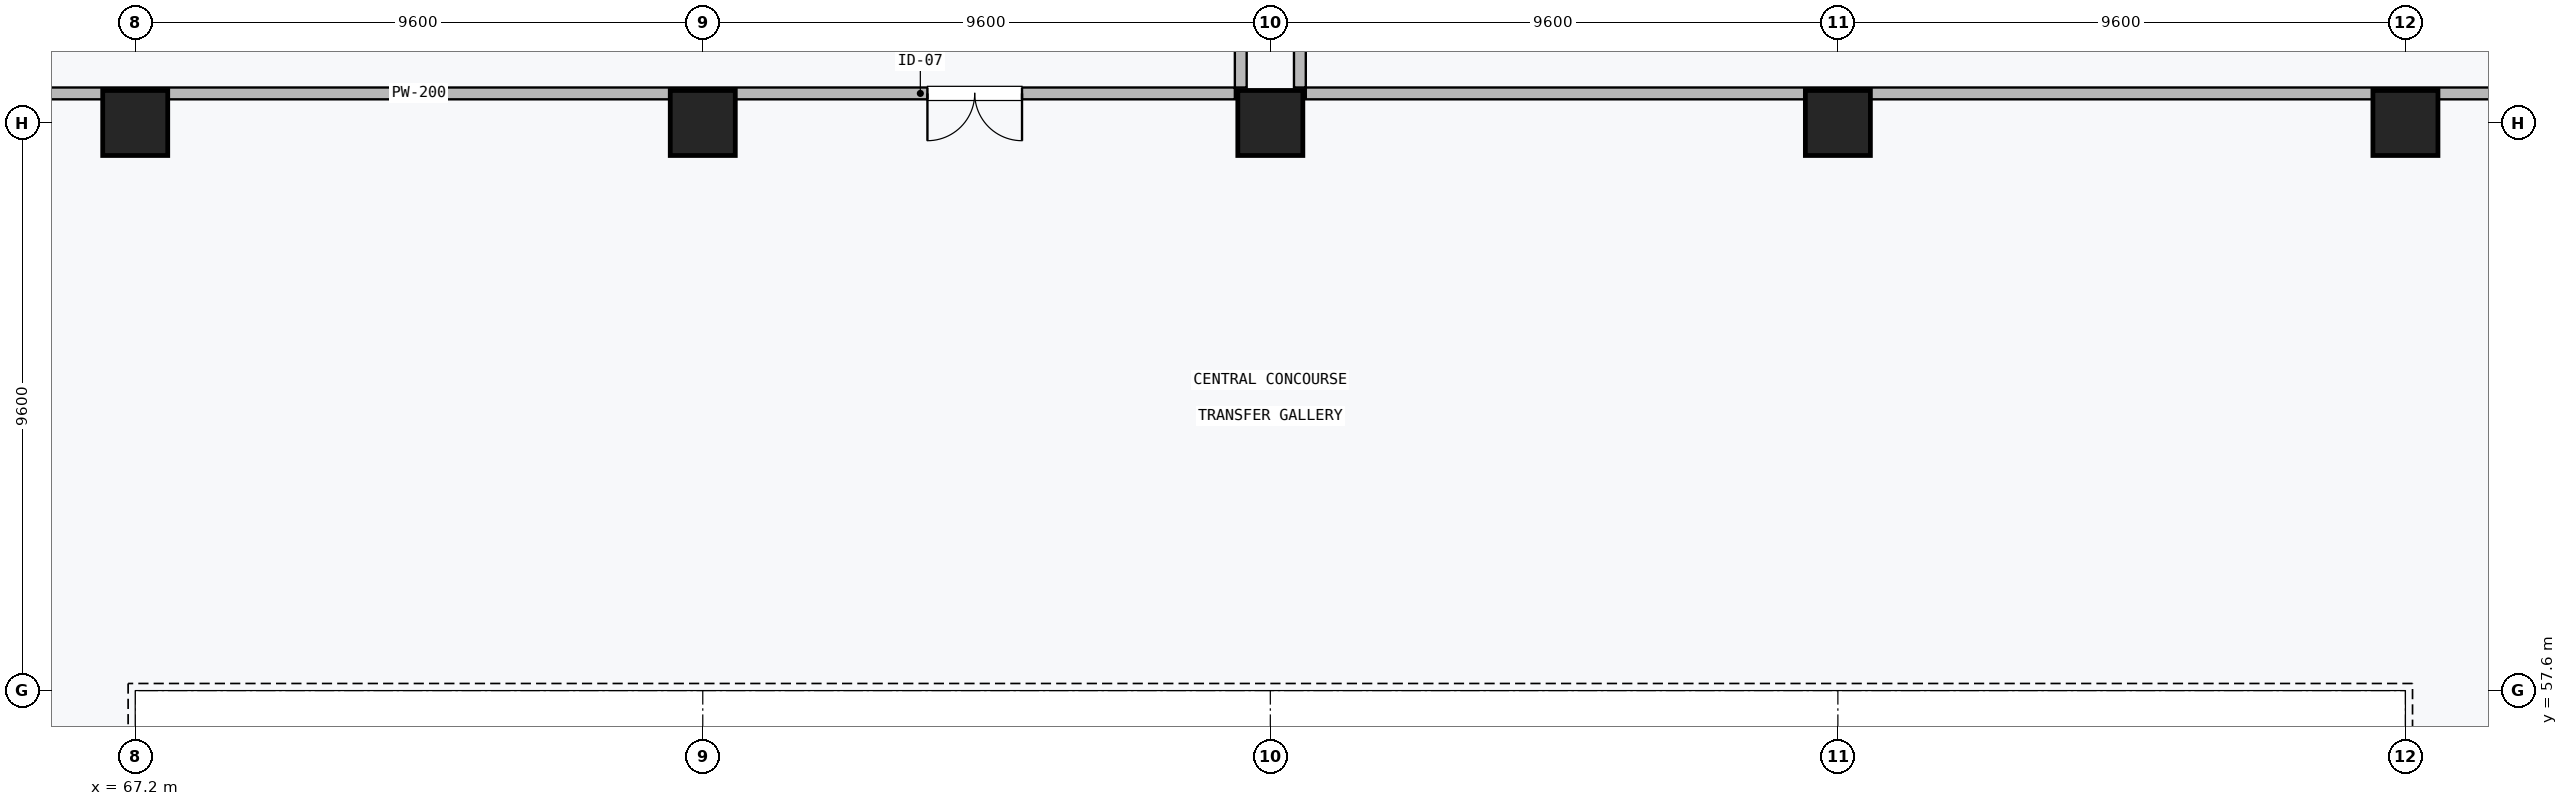
"""IFC4 building model, lengths in metres.
Left out: names, types, materials, properties, quantities, classifications, styles, units other than length and angle.
Written with IfcOpenShell. Run it as: python <this file> out.ifc"""

import sys

from ifc_helpers import new_model, si_unit, direction, frame, frame_2d, origin, origin_2d, place, context, subcontext, project, spatial, rectangle, extrude, element, fill, save


model = new_model("IFC4")
c1 = context("Model", 3, precision=1e-05, world=origin(), true_north=direction((0.0, 1.0)))
c2 = subcontext(c1, "Body", "Model", "MODEL_VIEW")
j1 = project(units=[si_unit("LENGTHUNIT", "METRE"), si_unit("PLANEANGLEUNIT", "RADIAN")], contexts=[c1])
p1 = place(None, origin())
s1 = spatial("IfcSite", under=j1, at=p1, CompositionType="ELEMENT")
p2 = place(p1, origin())
s2 = spatial("IfcBuilding", under=s1, at=p2, CompositionType="ELEMENT")
p3 = place(p2, frame((0.0, 0.0, -5.4)))
s3 = spatial("IfcBuildingStorey", under=s2, at=p3, CompositionType="ELEMENT", Elevation=-5.4)
for number, where, z_axis, x_axis in (
    (1, (67.2, 67.2, 0.0), (0.0, 0.0, 1.0), (1.0, 0.0, 0.0)),
    (2, (76.8, 67.2, 0.0), (0.0, 0.0, 1.0), (1.0, 0.0, 0.0)),
    (3, (86.4, 67.2, 0.0), (0.0, 0.0, 1.0), (1.0, 0.0, 0.0)),
    (4, (96.0, 67.2, 0.0), (0.0, 0.0, 1.0), (1.0, 0.0, 0.0)),
    (5, (105.6, 67.2, 0.0), (0.0, 0.0, 1.0), (1.0, 0.0, 0.0)),
):
    element("IfcColumn", number, at=place(p3, frame(where, z_axis=z_axis, x_axis=x_axis)), inside=s3, PredefinedType="COLUMN", context=c2, shape_type="SweptSolid", body=[
        extrude(rectangle(XDim=1.1, YDim=1.1, at=origin_2d()), origin(), (0.0, 0.0, 1.0), 5.0),
    ])
p4 = place(p3, frame((85.8, 67.7, 0.0), z_axis=(0.0, 0.0, 1.0), x_axis=(-1.0, 0.0, 0.0)))
e6 = element("IfcWall", 6, at=p4, inside=s3, PredefinedType="PARTITIONING", context=c2, shape_type="SweptSolid", body=[
    extrude(rectangle(XDim=27.6, YDim=0.2, at=frame_2d((13.8, 0.0))), origin(), (0.0, 0.0, 1.0), 3.04),
])
p5 = place(p4, frame((3.6, 0.0, 0.0)))
e7 = element("IfcOpeningElement", 7, at=p5, cuts=e6, PredefinedType="OPENING", context=c2, shape_type="SweptSolid", body=[
    extrude(rectangle(XDim=1.6, YDim=2.3, at=frame_2d((0.8, 1.15))), frame((0.0, 0.11, 0.0), z_axis=(0.0, -1.0, 0.0), x_axis=(1.0, 0.0, 0.0)), (0.0, 0.0, 1.0), 0.22),
])
p6 = place(p3, frame((85.9, 76.0, 0.0), z_axis=(0.0, 0.0, 1.0), x_axis=(0.0, -1.0, 0.0)))
e8 = element("IfcWall", 8, at=p6, inside=s3, PredefinedType="PARTITIONING", context=c2, shape_type="SweptSolid", body=[
    extrude(rectangle(XDim=8.2, YDim=0.2, at=frame_2d((4.1, 0.0))), origin(), (0.0, 0.0, 1.0), 3.19),
])
p7 = place(p3, frame((114.6, 67.7, 0.0), z_axis=(0.0, 0.0, 1.0), x_axis=(-1.0, 0.0, 0.0)))
e9 = element("IfcWall", 9, at=p7, inside=s3, PredefinedType="PARTITIONING", context=c2, shape_type="SweptSolid", body=[
    extrude(rectangle(XDim=27.6, YDim=0.2, at=frame_2d((13.8, 0.0))), origin(), (0.0, 0.0, 1.0), 3.04),
])
p8 = place(p7, frame((3.6, 0.0, 0.0)))
e10 = element("IfcOpeningElement", 10, at=p8, cuts=e9, PredefinedType="OPENING", context=c2, shape_type="SweptSolid", body=[
    extrude(rectangle(XDim=1.7, YDim=2.3, at=frame_2d((0.85, 1.15))), frame((0.0, 0.11, 0.0), z_axis=(0.0, -1.0, 0.0), x_axis=(1.0, 0.0, 0.0)), (0.0, 0.0, 1.0), 0.22),
])
p9 = place(p3, frame((86.9, 67.8, 0.0), z_axis=(0.0, 0.0, 1.0), x_axis=(0.0, 1.0, 0.0)))
e11 = element("IfcWall", 11, at=p9, inside=s3, PredefinedType="PARTITIONING", context=c2, shape_type="SweptSolid", body=[
    extrude(rectangle(XDim=8.2, YDim=0.2, at=frame_2d((4.1, 0.0))), origin(), (0.0, 0.0, 1.0), 3.19),
])
p10 = place(p5, origin())
e12 = element("IfcDoor", 12, at=p10, inside=s3, OperationType="DOUBLE_DOOR_SINGLE_SWING", PredefinedType="DOOR", context=c2, shape_type="SweptSolid", body=[
    extrude(rectangle(XDim=1.6, YDim=2.3, at=frame_2d((0.8, 1.15))), frame((0.0, 0.025, 0.0), z_axis=(0.0, -1.0, 0.0), x_axis=(1.0, 0.0, 0.0)), (0.0, 0.0, 1.0), 0.05),
])
fill(e7, e12)
save(model, sys.argv[1])
